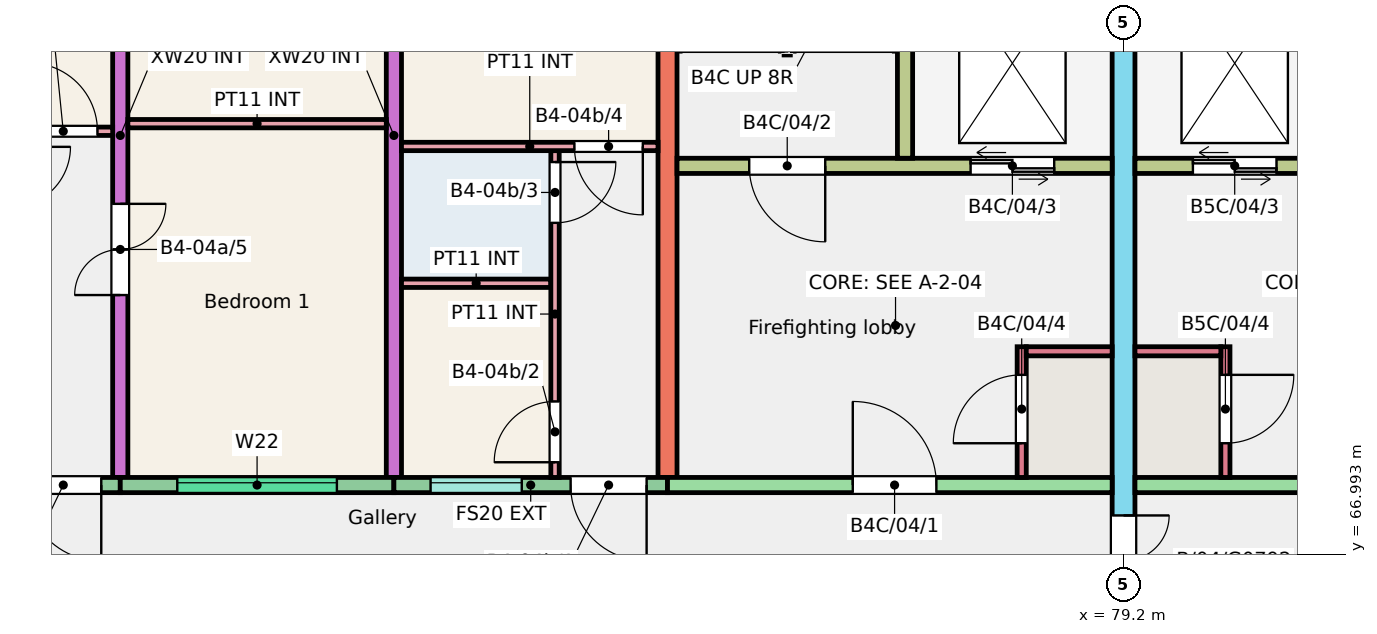
"""IFC4 building model, lengths in metres.
Left out: names, types, materials, properties, quantities, classifications, styles, units other than length and angle.
Written with IfcOpenShell. Run it as: python <this file> out.ifc"""

import sys

from ifc_helpers import new_model, si_unit, direction, frame, frame_2d, origin, place, context, subcontext, project, spatial, rectangle, extrude, element, fill, save


model = new_model("IFC4")
c1 = context("Model", 3, precision=1e-05, world=origin(), true_north=direction((0.0, 1.0)))
c2 = subcontext(c1, "Body", "Model", "MODEL_VIEW")
j1 = project(units=[si_unit("LENGTHUNIT", "METRE"), si_unit("PLANEANGLEUNIT", "RADIAN")], contexts=[c1])
p1 = place(None, origin())
s1 = spatial("IfcSite", under=j1, at=p1, CompositionType="ELEMENT")
p2 = place(p1, origin())
s2 = spatial("IfcBuilding", under=s1, at=p2, CompositionType="ELEMENT")
p3 = place(p2, frame((0.0, 0.0, 12.0)))
s3 = spatial("IfcBuildingStorey", under=s2, at=p3, CompositionType="ELEMENT", Elevation=12.0)
p4 = place(p3, frame((66.0, 68.0, 0.0), z_axis=(0.0, 0.0, 1.0), x_axis=(0.0, 1.0, 0.0)))
e1 = element("IfcWall", 1, at=p4, inside=s3, PredefinedType="SHEAR", context=c2, shape_type="SweptSolid", body=[
    extrude(rectangle(XDim=9.0, YDim=0.2, at=frame_2d((4.5, 0.0))), origin(), (0.0, 0.0, 1.0), 3.0),
])
p5 = place(p4, frame((2.4, 0.0, 0.0)))
e2 = element("IfcOpeningElement", 2, at=p5, cuts=e1, PredefinedType="OPENING", context=c2, shape_type="SweptSolid", body=[
    extrude(rectangle(XDim=1.2, YDim=2.1, at=frame_2d((0.6, 1.05))), frame((0.0, 0.11, 0.0), z_axis=(0.0, -1.0, 0.0), x_axis=(1.0, 0.0, 0.0)), (0.0, 0.0, 1.0), 0.22),
])
p6 = place(p4, frame((6.4, 0.0, 0.0)))
e3 = element("IfcOpeningElement", 3, at=p6, cuts=e1, PredefinedType="OPENING", context=c2, shape_type="SweptSolid", body=[
    extrude(rectangle(XDim=1.2, YDim=2.1, at=frame_2d((0.6, 1.05))), frame((0.0, 0.11, 0.0), z_axis=(0.0, -1.0, 0.0), x_axis=(1.0, 0.0, 0.0)), (0.0, 0.0, 1.0), 0.22),
])
p7 = place(p3, frame((69.6, 68.0, 0.0), z_axis=(0.0, 0.0, 1.0), x_axis=(0.0, 1.0, 0.0)))
e4 = element("IfcWall", 4, at=p7, inside=s3, PredefinedType="SHEAR", context=c2, shape_type="SweptSolid", body=[
    extrude(rectangle(XDim=9.0, YDim=0.2, at=frame_2d((4.5, 0.0))), origin(), (0.0, 0.0, 1.0), 3.0),
])
p8 = place(p3, frame((73.2, 68.0, 0.0), z_axis=(0.0, 0.0, 1.0), x_axis=(0.0, 1.0, 0.0)))
e5 = element("IfcWall", 5, at=p8, inside=s3, PredefinedType="SHEAR", context=c2, shape_type="SweptSolid", body=[
    extrude(rectangle(XDim=9.0, YDim=0.25, at=frame_2d((4.5, 0.0))), origin(), (0.0, 0.0, 1.0), 3.0),
])
p9 = place(p3, frame((79.2, 66.0, 0.0), z_axis=(0.0, 0.0, 1.0), x_axis=(0.0, 1.0, 0.0)))
e6 = element("IfcWall", 6, at=p9, inside=s3, PredefinedType="SHEAR", context=c2, shape_type="SweptSolid", body=[
    extrude(rectangle(XDim=11.0, YDim=0.3, at=frame_2d((5.5, 0.0))), origin(), (0.0, 0.0, 1.0), 3.0),
])
p10 = place(p9, frame((0.3, 0.0, 0.0)))
e7 = element("IfcOpeningElement", 7, at=p10, cuts=e6, PredefinedType="OPENING", context=c2, shape_type="SweptSolid", body=[
    extrude(rectangle(XDim=1.2, YDim=2.1, at=frame_2d((0.6, 1.05))), frame((0.0, 0.16, 0.0), z_axis=(0.0, -1.0, 0.0), x_axis=(1.0, 0.0, 0.0)), (0.0, 0.0, 1.0), 0.32),
])
p11 = place(p3, frame((62.55, 67.9, 0.0), z_axis=(0.0, 0.0, 1.0), x_axis=(1.0, 0.0, 0.0)))
e8 = element("IfcWall", 8, at=p11, inside=s3, PredefinedType="SOLIDWALL", context=c2, shape_type="SweptSolid", body=[
    extrude(rectangle(XDim=3.45, YDim=0.2, at=frame_2d((1.725, 0.0))), origin(), (0.0, 0.0, 1.0), 3.0),
])
p12 = place(p11, frame((0.37, 0.0, 1.1)))
e9 = element("IfcOpeningElement", 9, at=p12, cuts=e8, PredefinedType="OPENING", context=c2, shape_type="SweptSolid", body=[
    extrude(rectangle(XDim=1.2, YDim=1.3, at=frame_2d((0.6, 0.65))), frame((0.0, 0.11, 0.0), z_axis=(0.0, -1.0, 0.0), x_axis=(1.0, 0.0, 0.0)), (0.0, 0.0, 1.0), 0.22),
])
p13 = place(p11, frame((2.2, 0.0, 0.0)))
e10 = element("IfcOpeningElement", 10, at=p13, cuts=e8, PredefinedType="OPENING", context=c2, shape_type="SweptSolid", body=[
    extrude(rectangle(XDim=1.0, YDim=2.1, at=frame_2d((0.5, 1.05))), frame((0.0, 0.11, 0.0), z_axis=(0.0, -1.0, 0.0), x_axis=(1.0, 0.0, 0.0)), (0.0, 0.0, 1.0), 0.22),
])
p14 = place(p3, frame((66.0, 67.9, 0.0), z_axis=(0.0, 0.0, 1.0), x_axis=(1.0, 0.0, 0.0)))
e11 = element("IfcWall", 11, at=p14, inside=s3, PredefinedType="SOLIDWALL", context=c2, shape_type="SweptSolid", body=[
    extrude(rectangle(XDim=3.6, YDim=0.2, at=frame_2d((1.8, 0.0))), origin(), (0.0, 0.0, 1.0), 3.0),
])
p15 = place(p14, frame((0.75, 0.0, 1.2)))
e12 = element("IfcOpeningElement", 12, at=p15, cuts=e11, PredefinedType="OPENING", context=c2, shape_type="SweptSolid", body=[
    extrude(rectangle(XDim=2.1, YDim=1.2, at=frame_2d((1.05, 0.6))), frame((0.0, 0.11, 0.0), z_axis=(0.0, -1.0, 0.0), x_axis=(1.0, 0.0, 0.0)), (0.0, 0.0, 1.0), 0.22),
])
p16 = place(p3, frame((69.6, 67.9, 0.0), z_axis=(0.0, 0.0, 1.0), x_axis=(1.0, 0.0, 0.0)))
e13 = element("IfcWall", 13, at=p16, inside=s3, PredefinedType="SOLIDWALL", context=c2, shape_type="SweptSolid", body=[
    extrude(rectangle(XDim=3.6, YDim=0.2, at=frame_2d((1.8, 0.0))), origin(), (0.0, 0.0, 1.0), 3.0),
])
p17 = place(p16, frame((0.482, 0.0, 1.1)))
e14 = element("IfcOpeningElement", 14, at=p17, cuts=e13, PredefinedType="OPENING", context=c2, shape_type="SweptSolid", body=[
    extrude(rectangle(XDim=1.2, YDim=1.3, at=frame_2d((0.6, 0.65))), frame((0.0, 0.11, 0.0), z_axis=(0.0, -1.0, 0.0), x_axis=(1.0, 0.0, 0.0)), (0.0, 0.0, 1.0), 0.22),
])
p18 = place(p16, frame((2.325, 0.0, 0.0)))
e15 = element("IfcOpeningElement", 15, at=p18, cuts=e13, PredefinedType="OPENING", context=c2, shape_type="SweptSolid", body=[
    extrude(rectangle(XDim=1.0, YDim=2.1, at=frame_2d((0.5, 1.05))), frame((0.0, 0.11, 0.0), z_axis=(0.0, -1.0, 0.0), x_axis=(1.0, 0.0, 0.0)), (0.0, 0.0, 1.0), 0.22),
])
p19 = place(p3, frame((73.2, 67.9, 0.0), z_axis=(0.0, 0.0, 1.0), x_axis=(1.0, 0.0, 0.0)))
e16 = element("IfcWall", 16, at=p19, inside=s3, PredefinedType="SHEAR", context=c2, shape_type="SweptSolid", body=[
    extrude(rectangle(XDim=5.85, YDim=0.2, at=frame_2d((2.925, 0.0))), origin(), (0.0, 0.0, 1.0), 3.0),
])
p20 = place(p19, frame((2.438, 0.0, 0.0)))
e17 = element("IfcOpeningElement", 17, at=p20, cuts=e16, PredefinedType="OPENING", context=c2, shape_type="SweptSolid", body=[
    extrude(rectangle(XDim=1.1, YDim=2.1, at=frame_2d((0.55, 1.05))), frame((0.0, 0.11, 0.0), z_axis=(0.0, -1.0, 0.0), x_axis=(1.0, 0.0, 0.0)), (0.0, 0.0, 1.0), 0.22),
])
p21 = place(p3, frame((73.325, 72.1, 0.0), z_axis=(0.0, 0.0, 1.0), x_axis=(1.0, 0.0, 0.0)))
e18 = element("IfcWall", 18, at=p21, inside=s3, PredefinedType="SHEAR", context=c2, shape_type="SweptSolid", body=[
    extrude(rectangle(XDim=5.725, YDim=0.2, at=frame_2d((2.863, 0.0))), origin(), (0.0, 0.0, 1.0), 3.0),
])
p22 = place(p21, frame((0.95, 0.0, 0.0)))
e19 = element("IfcOpeningElement", 19, at=p22, cuts=e18, PredefinedType="OPENING", context=c2, shape_type="SweptSolid", body=[
    extrude(rectangle(XDim=1.0, YDim=2.1, at=frame_2d((0.5, 1.05))), frame((0.0, 0.11, 0.0), z_axis=(0.0, -1.0, 0.0), x_axis=(1.0, 0.0, 0.0)), (0.0, 0.0, 1.0), 0.22),
])
p23 = place(p21, frame((3.863, 0.0, 0.0)))
e20 = element("IfcOpeningElement", 20, at=p23, cuts=e18, PredefinedType="OPENING", context=c2, shape_type="SweptSolid", body=[
    extrude(rectangle(XDim=1.1, YDim=2.1, at=frame_2d((0.55, 1.05))), frame((0.0, 0.11, 0.0), z_axis=(0.0, -1.0, 0.0), x_axis=(1.0, 0.0, 0.0)), (0.0, 0.0, 1.0), 0.22),
])
p24 = place(p3, frame((76.325, 72.2, 0.0), z_axis=(0.0, 0.0, 1.0), x_axis=(0.0, 1.0, 0.0)))
e21 = element("IfcWall", 21, at=p24, inside=s3, PredefinedType="SHEAR", context=c2, shape_type="SweptSolid", body=[
    extrude(rectangle(XDim=4.8, YDim=0.2, at=frame_2d((2.4, 0.0))), origin(), (0.0, 0.0, 1.0), 3.0),
])
p25 = place(p3, frame((77.86, 68.0, 0.0), z_axis=(0.0, 0.0, 1.0), x_axis=(0.0, 1.0, 0.0)))
e22 = element("IfcWall", 22, at=p25, inside=s3, PredefinedType="SHEAR", context=c2, shape_type="SweptSolid", body=[
    extrude(rectangle(XDim=1.72, YDim=0.12, at=frame_2d((0.86, 0.0))), origin(), (0.0, 0.0, 1.0), 3.0),
])
p26 = place(p25, frame((0.45, 0.0, 0.0)))
e23 = element("IfcOpeningElement", 23, at=p26, cuts=e22, PredefinedType="OPENING", context=c2, shape_type="SweptSolid", body=[
    extrude(rectangle(XDim=0.9, YDim=2.1, at=frame_2d((0.45, 1.05))), frame((0.0, 0.07, 0.0), z_axis=(0.0, -1.0, 0.0), x_axis=(1.0, 0.0, 0.0)), (0.0, 0.0, 1.0), 0.14),
])
p27 = place(p3, frame((77.92, 69.66, 0.0), z_axis=(0.0, 0.0, 1.0), x_axis=(1.0, 0.0, 0.0)))
e24 = element("IfcWall", 24, at=p27, inside=s3, PredefinedType="SHEAR", context=c2, shape_type="SweptSolid", body=[
    extrude(rectangle(XDim=1.13, YDim=0.12, at=frame_2d((0.565, 0.0))), origin(), (0.0, 0.0, 1.0), 3.0),
])
p28 = place(p3, frame((79.35, 67.9, 0.0), z_axis=(0.0, 0.0, 1.0), x_axis=(1.0, 0.0, 0.0)))
e25 = element("IfcWall", 25, at=p28, inside=s3, PredefinedType="SHEAR", context=c2, shape_type="SweptSolid", body=[
    extrude(rectangle(XDim=5.85, YDim=0.2, at=frame_2d((2.925, 0.0))), origin(), (0.0, 0.0, 1.0), 3.0),
])
p29 = place(p28, frame((2.312, 0.0, 0.0)))
e26 = element("IfcOpeningElement", 26, at=p29, cuts=e25, PredefinedType="OPENING", context=c2, shape_type="SweptSolid", body=[
    extrude(rectangle(XDim=1.1, YDim=2.1, at=frame_2d((0.55, 1.05))), frame((0.0, 0.11, 0.0), z_axis=(0.0, -1.0, 0.0), x_axis=(1.0, 0.0, 0.0)), (0.0, 0.0, 1.0), 0.22),
])
p30 = place(p3, frame((79.35, 72.1, 0.0), z_axis=(0.0, 0.0, 1.0), x_axis=(1.0, 0.0, 0.0)))
e27 = element("IfcWall", 27, at=p30, inside=s3, PredefinedType="SHEAR", context=c2, shape_type="SweptSolid", body=[
    extrude(rectangle(XDim=5.725, YDim=0.2, at=frame_2d((2.862, 0.0))), origin(), (0.0, 0.0, 1.0), 3.0),
])
p31 = place(p30, frame((3.775, 0.0, 0.0)))
e28 = element("IfcOpeningElement", 28, at=p31, cuts=e27, PredefinedType="OPENING", context=c2, shape_type="SweptSolid", body=[
    extrude(rectangle(XDim=1.0, YDim=2.1, at=frame_2d((0.5, 1.05))), frame((0.0, 0.11, 0.0), z_axis=(0.0, -1.0, 0.0), x_axis=(1.0, 0.0, 0.0)), (0.0, 0.0, 1.0), 0.22),
])
p32 = place(p30, frame((0.762, 0.0, 0.0)))
e29 = element("IfcOpeningElement", 29, at=p32, cuts=e27, PredefinedType="OPENING", context=c2, shape_type="SweptSolid", body=[
    extrude(rectangle(XDim=1.1, YDim=2.1, at=frame_2d((0.55, 1.05))), frame((0.0, 0.11, 0.0), z_axis=(0.0, -1.0, 0.0), x_axis=(1.0, 0.0, 0.0)), (0.0, 0.0, 1.0), 0.22),
])
p33 = place(p3, frame((80.54, 68.0, 0.0), z_axis=(0.0, 0.0, 1.0), x_axis=(0.0, 1.0, 0.0)))
e30 = element("IfcWall", 30, at=p33, inside=s3, PredefinedType="SHEAR", context=c2, shape_type="SweptSolid", body=[
    extrude(rectangle(XDim=1.72, YDim=0.12, at=frame_2d((0.86, 0.0))), origin(), (0.0, 0.0, 1.0), 3.0),
])
p34 = place(p33, frame((0.45, 0.0, 0.0)))
e31 = element("IfcOpeningElement", 31, at=p34, cuts=e30, PredefinedType="OPENING", context=c2, shape_type="SweptSolid", body=[
    extrude(rectangle(XDim=0.9, YDim=2.1, at=frame_2d((0.45, 1.05))), frame((0.0, 0.07, 0.0), z_axis=(0.0, -1.0, 0.0), x_axis=(1.0, 0.0, 0.0)), (0.0, 0.0, 1.0), 0.14),
])
p35 = place(p3, frame((79.35, 69.66, 0.0), z_axis=(0.0, 0.0, 1.0), x_axis=(1.0, 0.0, 0.0)))
e32 = element("IfcWall", 32, at=p35, inside=s3, PredefinedType="SHEAR", context=c2, shape_type="SweptSolid", body=[
    extrude(rectangle(XDim=1.13, YDim=0.12, at=frame_2d((0.565, 0.0))), origin(), (0.0, 0.0, 1.0), 3.0),
])
p36 = place(p3, frame((62.55, 72.555, 0.0), z_axis=(0.0, 0.0, 1.0), x_axis=(1.0, 0.0, 0.0)))
e33 = element("IfcWall", 33, at=p36, inside=s3, PredefinedType="PARTITIONING", context=c2, shape_type="SweptSolid", body=[
    extrude(rectangle(XDim=3.35, YDim=0.11, at=frame_2d((1.675, 0.0))), origin(), (0.0, 0.0, 1.0), 2.8),
])
p37 = place(p36, frame((2.25, 0.0, 0.0)))
e34 = element("IfcOpeningElement", 34, at=p37, cuts=e33, PredefinedType="OPENING", context=c2, shape_type="SweptSolid", body=[
    extrude(rectangle(XDim=0.9, YDim=2.1, at=frame_2d((0.45, 1.05))), frame((0.0, 0.065, 0.0), z_axis=(0.0, -1.0, 0.0), x_axis=(1.0, 0.0, 0.0)), (0.0, 0.0, 1.0), 0.13),
])
p38 = place(p3, frame((66.1, 72.655, 0.0), z_axis=(0.0, 0.0, 1.0), x_axis=(1.0, 0.0, 0.0)))
e35 = element("IfcWall", 35, at=p38, inside=s3, PredefinedType="PARTITIONING", context=c2, shape_type="SweptSolid", body=[
    extrude(rectangle(XDim=3.4, YDim=0.11, at=frame_2d((1.7, 0.0))), origin(), (0.0, 0.0, 1.0), 2.8),
])
p39 = place(p3, frame((69.7, 70.555, 0.0), z_axis=(0.0, 0.0, 1.0), x_axis=(1.0, 0.0, 0.0)))
e36 = element("IfcWall", 36, at=p39, inside=s3, PredefinedType="PARTITIONING", context=c2, shape_type="SweptSolid", body=[
    extrude(rectangle(XDim=1.965, YDim=0.11, at=frame_2d((0.982, 0.0))), origin(), (0.0, 0.0, 1.0), 2.8),
])
p40 = place(p3, frame((71.72, 68.0, 0.0), z_axis=(0.0, 0.0, 1.0), x_axis=(0.0, 1.0, 0.0)))
e37 = element("IfcWall", 37, at=p40, inside=s3, PredefinedType="PARTITIONING", context=c2, shape_type="SweptSolid", body=[
    extrude(rectangle(XDim=4.3, YDim=0.11, at=frame_2d((2.15, 0.0))), origin(), (0.0, 0.0, 1.0), 2.8),
])
p41 = place(p40, frame((0.2, 0.0, 0.0)))
e38 = element("IfcOpeningElement", 38, at=p41, cuts=e37, PredefinedType="OPENING", context=c2, shape_type="SweptSolid", body=[
    extrude(rectangle(XDim=0.8, YDim=2.1, at=frame_2d((0.4, 1.05))), frame((0.0, 0.065, 0.0), z_axis=(0.0, -1.0, 0.0), x_axis=(1.0, 0.0, 0.0)), (0.0, 0.0, 1.0), 0.13),
])
p42 = place(p40, frame((3.35, 0.0, 0.0)))
e39 = element("IfcOpeningElement", 39, at=p42, cuts=e37, PredefinedType="OPENING", context=c2, shape_type="SweptSolid", body=[
    extrude(rectangle(XDim=0.8, YDim=2.1, at=frame_2d((0.4, 1.05))), frame((0.0, 0.065, 0.0), z_axis=(0.0, -1.0, 0.0), x_axis=(1.0, 0.0, 0.0)), (0.0, 0.0, 1.0), 0.13),
])
p43 = place(p3, frame((69.7, 72.355, 0.0), z_axis=(0.0, 0.0, 1.0), x_axis=(1.0, 0.0, 0.0)))
e40 = element("IfcWall", 40, at=p43, inside=s3, PredefinedType="PARTITIONING", context=c2, shape_type="SweptSolid", body=[
    extrude(rectangle(XDim=3.375, YDim=0.11, at=frame_2d((1.688, 0.0))), origin(), (0.0, 0.0, 1.0), 2.8),
])
p44 = place(p43, frame((2.275, 0.0, 0.0)))
e41 = element("IfcOpeningElement", 41, at=p44, cuts=e40, PredefinedType="OPENING", context=c2, shape_type="SweptSolid", body=[
    extrude(rectangle(XDim=0.9, YDim=2.1, at=frame_2d((0.45, 1.05))), frame((0.0, 0.065, 0.0), z_axis=(0.0, -1.0, 0.0), x_axis=(1.0, 0.0, 0.0)), (0.0, 0.0, 1.0), 0.13),
])
p45 = place(p15, origin())
e42 = element("IfcWindow", 42, at=p45, inside=s3, PartitioningType="SINGLE_PANEL", PredefinedType="WINDOW", context=c2, shape_type="SweptSolid", body=[
    extrude(rectangle(XDim=2.1, YDim=1.2, at=frame_2d((1.05, 0.6))), frame((0.0, 0.06, 0.0), z_axis=(0.0, -1.0, 0.0), x_axis=(1.0, 0.0, 0.0)), (0.0, 0.0, 1.0), 0.06),
])
fill(e12, e42)
p46 = place(p17, origin())
e43 = element("IfcWindow", 43, at=p46, inside=s3, PartitioningType="SINGLE_PANEL", PredefinedType="WINDOW", context=c2, shape_type="SweptSolid", body=[
    extrude(rectangle(XDim=1.2, YDim=1.3, at=frame_2d((0.6, 0.65))), frame((0.0, 0.06, 0.0), z_axis=(0.0, -1.0, 0.0), x_axis=(1.0, 0.0, 0.0)), (0.0, 0.0, 1.0), 0.06),
])
fill(e14, e43)
p47 = place(p13, origin())
e44 = element("IfcDoor", 44, at=p47, inside=s3, OperationType="SINGLE_SWING_RIGHT", PredefinedType="DOOR", context=c2, shape_type="SweptSolid", body=[
    extrude(rectangle(XDim=1.0, YDim=2.1, at=frame_2d((0.5, 1.05))), frame((0.0, 0.025, 0.0), z_axis=(0.0, -1.0, 0.0), x_axis=(1.0, 0.0, 0.0)), (0.0, 0.0, 1.0), 0.05),
])
fill(e10, e44)
p48 = place(p37, origin())
e45 = element("IfcDoor", 45, at=p48, inside=s3, OperationType="SINGLE_SWING_LEFT", PredefinedType="DOOR", context=c2, shape_type="SweptSolid", body=[
    extrude(rectangle(XDim=0.9, YDim=2.1, at=frame_2d((0.45, 1.05))), frame((0.0, 0.025, 0.0), z_axis=(0.0, -1.0, 0.0), x_axis=(1.0, 0.0, 0.0)), (0.0, 0.0, 1.0), 0.05),
])
fill(e34, e45)
p49 = place(p5, origin())
e46 = element("IfcDoor", 46, at=p49, inside=s3, OperationType="DOUBLE_DOOR_SINGLE_SWING", PredefinedType="DOOR", context=c2, shape_type="SweptSolid", body=[
    extrude(rectangle(XDim=1.2, YDim=2.1, at=frame_2d((0.6, 1.05))), frame((0.0, 0.025, 0.0), z_axis=(0.0, -1.0, 0.0), x_axis=(1.0, 0.0, 0.0)), (0.0, 0.0, 1.0), 0.05),
])
fill(e2, e46)
p50 = place(p18, origin())
e47 = element("IfcDoor", 47, at=p50, inside=s3, OperationType="SINGLE_SWING_RIGHT", PredefinedType="DOOR", context=c2, shape_type="SweptSolid", body=[
    extrude(rectangle(XDim=1.0, YDim=2.1, at=frame_2d((0.5, 1.05))), frame((0.0, 0.025, 0.0), z_axis=(0.0, -1.0, 0.0), x_axis=(1.0, 0.0, 0.0)), (0.0, 0.0, 1.0), 0.05),
])
fill(e15, e47)
p51 = place(p41, origin())
e48 = element("IfcDoor", 48, at=p51, inside=s3, OperationType="SINGLE_SWING_LEFT", PredefinedType="DOOR", context=c2, shape_type="SweptSolid", body=[
    extrude(rectangle(XDim=0.8, YDim=2.1, at=frame_2d((0.4, 1.05))), frame((0.0, 0.025, 0.0), z_axis=(0.0, -1.0, 0.0), x_axis=(1.0, 0.0, 0.0)), (0.0, 0.0, 1.0), 0.05),
])
fill(e38, e48)
p52 = place(p42, origin())
e49 = element("IfcDoor", 49, at=p52, inside=s3, OperationType="SINGLE_SWING_RIGHT", PredefinedType="DOOR", context=c2, shape_type="SweptSolid", body=[
    extrude(rectangle(XDim=0.8, YDim=2.1, at=frame_2d((0.4, 1.05))), frame((0.0, 0.025, 0.0), z_axis=(0.0, -1.0, 0.0), x_axis=(1.0, 0.0, 0.0)), (0.0, 0.0, 1.0), 0.05),
])
fill(e39, e49)
p53 = place(p44, origin())
e50 = element("IfcDoor", 50, at=p53, inside=s3, OperationType="SINGLE_SWING_RIGHT", PredefinedType="DOOR", context=c2, shape_type="SweptSolid", body=[
    extrude(rectangle(XDim=0.9, YDim=2.1, at=frame_2d((0.45, 1.05))), frame((0.0, 0.025, 0.0), z_axis=(0.0, -1.0, 0.0), x_axis=(1.0, 0.0, 0.0)), (0.0, 0.0, 1.0), 0.05),
])
fill(e41, e50)
p54 = place(p20, origin())
e51 = element("IfcDoor", 51, at=p54, inside=s3, OperationType="SINGLE_SWING_LEFT", PredefinedType="DOOR", context=c2, shape_type="SweptSolid", body=[
    extrude(rectangle(XDim=1.1, YDim=2.1, at=frame_2d((0.55, 1.05))), frame((0.0, 0.025, 0.0), z_axis=(0.0, -1.0, 0.0), x_axis=(1.0, 0.0, 0.0)), (0.0, 0.0, 1.0), 0.05),
])
fill(e17, e51)
p55 = place(p22, origin())
e52 = element("IfcDoor", 52, at=p55, inside=s3, OperationType="SINGLE_SWING_RIGHT", PredefinedType="DOOR", context=c2, shape_type="SweptSolid", body=[
    extrude(rectangle(XDim=1.0, YDim=2.1, at=frame_2d((0.5, 1.05))), frame((0.0, 0.025, 0.0), z_axis=(0.0, -1.0, 0.0), x_axis=(1.0, 0.0, 0.0)), (0.0, 0.0, 1.0), 0.05),
])
fill(e19, e52)
p56 = place(p23, origin())
e53 = element("IfcDoor", 53, at=p56, inside=s3, OperationType="DOUBLE_DOOR_SLIDING", PredefinedType="DOOR", context=c2, shape_type="SweptSolid", body=[
    extrude(rectangle(XDim=1.1, YDim=2.1, at=frame_2d((0.55, 1.05))), frame((0.0, 0.025, 0.0), z_axis=(0.0, -1.0, 0.0), x_axis=(1.0, 0.0, 0.0)), (0.0, 0.0, 1.0), 0.05),
])
fill(e20, e53)
p57 = place(p26, origin())
e54 = element("IfcDoor", 54, at=p57, inside=s3, OperationType="SINGLE_SWING_LEFT", PredefinedType="DOOR", context=c2, shape_type="SweptSolid", body=[
    extrude(rectangle(XDim=0.9, YDim=2.1, at=frame_2d((0.45, 1.05))), frame((0.0, 0.025, 0.0), z_axis=(0.0, -1.0, 0.0), x_axis=(1.0, 0.0, 0.0)), (0.0, 0.0, 1.0), 0.05),
])
fill(e23, e54)
p58 = place(p32, origin())
e55 = element("IfcDoor", 55, at=p58, inside=s3, OperationType="DOUBLE_DOOR_SLIDING", PredefinedType="DOOR", context=c2, shape_type="SweptSolid", body=[
    extrude(rectangle(XDim=1.1, YDim=2.1, at=frame_2d((0.55, 1.05))), frame((0.0, 0.025, 0.0), z_axis=(0.0, -1.0, 0.0), x_axis=(1.0, 0.0, 0.0)), (0.0, 0.0, 1.0), 0.05),
])
fill(e29, e55)
p59 = place(p34, origin())
e56 = element("IfcDoor", 56, at=p59, inside=s3, OperationType="SINGLE_SWING_RIGHT", PredefinedType="DOOR", context=c2, shape_type="SweptSolid", body=[
    extrude(rectangle(XDim=0.9, YDim=2.1, at=frame_2d((0.45, 1.05))), frame((0.0, 0.025, 0.0), z_axis=(0.0, -1.0, 0.0), x_axis=(1.0, 0.0, 0.0)), (0.0, 0.0, 1.0), 0.05),
])
fill(e31, e56)
p60 = place(p10, origin())
e57 = element("IfcDoor", 57, at=p60, inside=s3, OperationType="DOUBLE_DOOR_SINGLE_SWING", PredefinedType="DOOR", context=c2, shape_type="SweptSolid", body=[
    extrude(rectangle(XDim=1.2, YDim=2.1, at=frame_2d((0.6, 1.05))), frame((0.0, 0.025, 0.0), z_axis=(0.0, -1.0, 0.0), x_axis=(1.0, 0.0, 0.0)), (0.0, 0.0, 1.0), 0.05),
])
fill(e7, e57)
save(model, sys.argv[1])
